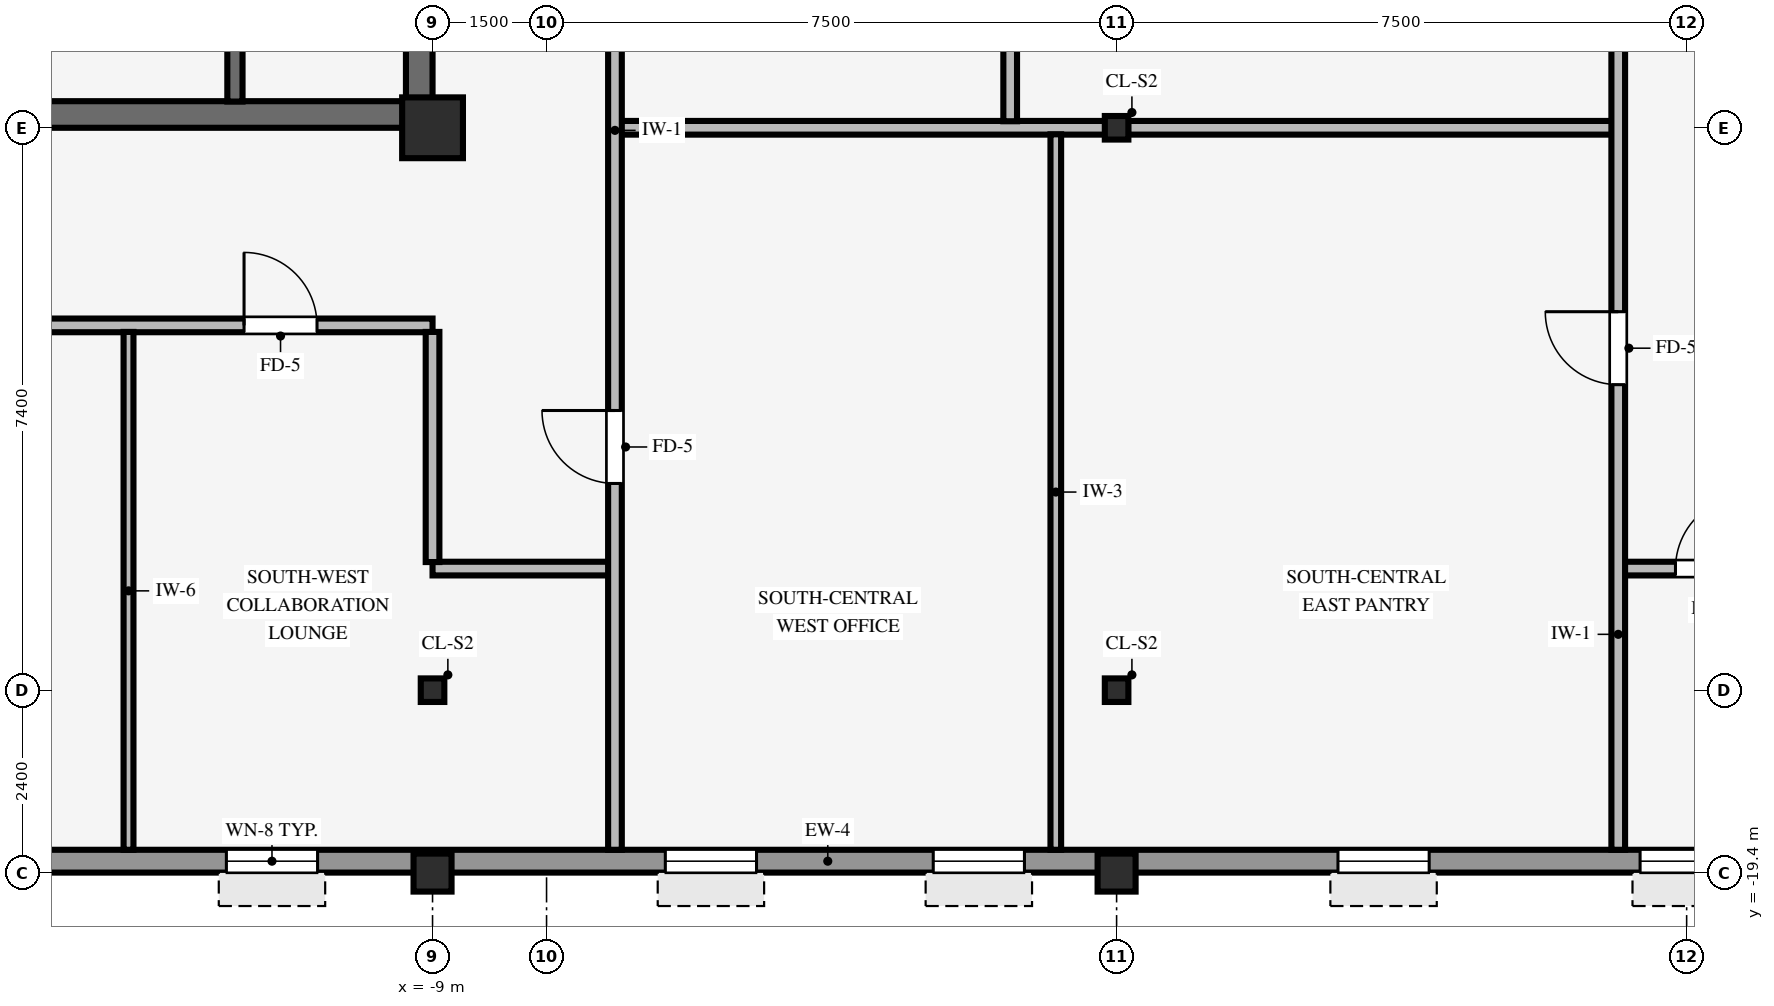
"""IFC4 building model, lengths in metres.
Left out: names, types, materials, properties, quantities, classifications, styles, units other than length and angle.
Written with IfcOpenShell. Run it as: python <this file> out.ifc"""

import sys

from ifc_helpers import new_model, si_unit, direction, frame, frame_2d, origin, origin_2d, place, context, subcontext, project, spatial, rectangle, hollow_rectangle, i_section, extrude, source, transform, mapped, element, fill, save


model = new_model("IFC4")
c1 = context("Model", 3, precision=1e-05, world=origin(), true_north=direction((0.0, 1.0)))
c2 = subcontext(c1, "Body", "Model", "MODEL_VIEW")
j1 = project(units=[si_unit("LENGTHUNIT", "METRE"), si_unit("PLANEANGLEUNIT", "RADIAN")], contexts=[c1])
p1 = place(None, origin())
s1 = spatial("IfcSite", under=j1, at=p1, CompositionType="ELEMENT")
p2 = place(p1, origin())
s2 = spatial("IfcBuilding", under=s1, at=p2, CompositionType="ELEMENT")
p3 = place(p2, frame((0.0, 0.0, 238.35)))
s3 = spatial("IfcBuildingStorey", under=s2, at=p3, CompositionType="ELEMENT", Elevation=238.35)
p4 = place(p3, frame((-17.5, -9.425, 0.0), z_axis=(0.0, 0.0, 1.0), x_axis=(1.0, 0.0, 0.0)))
e1 = element("IfcWall", 1, at=p4, inside=s3, PredefinedType="SHEAR", context=c2, shape_type="SweptSolid", body=[
    extrude(rectangle(XDim=8.5, YDim=0.35, at=frame_2d((4.25, 0.0))), origin(), (0.0, 0.0, 1.0), 3.37),
])
p5 = place(p3, frame((-9.175, -9.255, 0.0), z_axis=(0.0, 0.0, 1.0), x_axis=(0.0, 1.0, 0.0)))
e2 = element("IfcWall", 2, at=p5, inside=s3, PredefinedType="SHEAR", context=c2, shape_type="SweptSolid", body=[
    extrude(rectangle(XDim=18.51, YDim=0.35, at=frame_2d((9.255, 0.0))), origin(), (0.0, 0.0, 1.0), 3.37),
])
p6 = place(p5, frame((8.655, 0.0, 0.0)))
e3 = element("IfcOpeningElement", 3, at=p6, cuts=e2, PredefinedType="OPENING", context=c2, shape_type="SweptSolid", body=[
    extrude(rectangle(XDim=1.2, YDim=2.15, at=frame_2d((0.6, 1.075))), frame((0.0, 0.185, 0.0), z_axis=(0.0, -1.0, 0.0), x_axis=(1.0, 0.0, 0.0)), (0.0, 0.0, 1.0), 0.37),
])
p7 = place(p3, frame((-9.0, -9.6, 0.0), z_axis=(0.0, 0.0, 1.0), x_axis=(1.0, 0.0, 0.0)))
e4 = element("IfcColumn", 4, at=p7, inside=s3, PredefinedType="COLUMN", context=c2, shape_type="SweptSolid", body=[
    extrude(rectangle(XDim=0.8, YDim=0.8, at=origin_2d()), origin(), (0.0, 0.0, 1.0), 3.37),
])
for number, where, z_axis, x_axis in (
    (5, (-9.0, -19.4, 0.0), (0.0, 0.0, 1.0), (1.0, 0.0, 0.0)),
    (6, (0.0, -19.4, 0.0), (0.0, 0.0, 1.0), (1.0, 0.0, 0.0)),
):
    element("IfcColumn", number, at=place(p3, frame(where, z_axis=z_axis, x_axis=x_axis)), inside=s3, PredefinedType="COLUMN", context=c2, shape_type="SweptSolid", body=[
        extrude(hollow_rectangle(XDim=0.5, YDim=0.5, WallThickness=0.032, InnerFilletRadius=0.032, OuterFilletRadius=0.064, at=origin_2d()), origin(), (0.0, 0.0, 1.0), 3.37),
    ])
for number, where, z_axis, x_axis in (
    (7, (0.0, -17.0, 0.0), (0.0, 0.0, 1.0), (1.0, 0.0, 0.0)),
    (8, (0.0, -9.6, 0.0), (0.0, 0.0, 1.0), (1.0, 0.0, 0.0)),
    (9, (-9.0, -17.0, 0.0), (0.0, 0.0, 1.0), (1.0, 0.0, 0.0)),
):
    element("IfcColumn", number, at=place(p3, frame(where, z_axis=z_axis, x_axis=x_axis)), inside=s3, PredefinedType="COLUMN", context=c2, shape_type="SweptSolid", body=[
        extrude(i_section(OverallWidth=0.31, OverallDepth=0.31, WebThickness=0.015, FlangeThickness=0.015, FilletRadius=0.015, at=origin_2d()), origin(), (0.0, 0.0, 1.0), 3.37),
    ])
p8 = place(p3, frame((-24.3, -19.25, 0.0), z_axis=(0.0, 0.0, 1.0), x_axis=(1.0, 0.0, 0.0)))
e10 = element("IfcWall", 10, at=p8, inside=s3, PredefinedType="STANDARD", context=c2, shape_type="SweptSolid", body=[
    extrude(rectangle(XDim=41.0, YDim=0.3, at=frame_2d((20.5, 0.0))), origin(), (0.0, 0.0, 1.0), 2.705),
])
p9 = place(p8, frame((2.837, 0.0, 0.8)))
e11 = element("IfcOpeningElement", 11, at=p9, cuts=e10, PredefinedType="OPENING", context=c2, shape_type="SweptSolid", body=[
    extrude(rectangle(XDim=1.2, YDim=1.48, at=frame_2d((0.6, 0.74))), frame((0.0, 0.16, 0.0), z_axis=(0.0, -1.0, 0.0), x_axis=(1.0, 0.0, 0.0)), (0.0, 0.0, 1.0), 0.32),
])
p10 = place(p8, frame((7.712, 0.0, 0.8)))
e12 = element("IfcOpeningElement", 12, at=p10, cuts=e10, PredefinedType="OPENING", context=c2, shape_type="SweptSolid", body=[
    extrude(rectangle(XDim=1.2, YDim=1.48, at=frame_2d((0.6, 0.74))), frame((0.0, 0.16, 0.0), z_axis=(0.0, -1.0, 0.0), x_axis=(1.0, 0.0, 0.0)), (0.0, 0.0, 1.0), 0.32),
])
p11 = place(p8, frame((12.587, 0.0, 0.8)))
e13 = element("IfcOpeningElement", 13, at=p11, cuts=e10, PredefinedType="OPENING", context=c2, shape_type="SweptSolid", body=[
    extrude(rectangle(XDim=1.2, YDim=1.48, at=frame_2d((0.6, 0.74))), frame((0.0, 0.16, 0.0), z_axis=(0.0, -1.0, 0.0), x_axis=(1.0, 0.0, 0.0)), (0.0, 0.0, 1.0), 0.32),
])
p12 = place(p8, frame((18.363, 0.0, 0.8)))
e14 = element("IfcOpeningElement", 14, at=p12, cuts=e10, PredefinedType="OPENING", context=c2, shape_type="SweptSolid", body=[
    extrude(rectangle(XDim=1.2, YDim=1.48, at=frame_2d((0.6, 0.74))), frame((0.0, 0.16, 0.0), z_axis=(0.0, -1.0, 0.0), x_axis=(1.0, 0.0, 0.0)), (0.0, 0.0, 1.0), 0.32),
])
p13 = place(p8, frame((21.887, 0.0, 0.8)))
e15 = element("IfcOpeningElement", 15, at=p13, cuts=e10, PredefinedType="OPENING", context=c2, shape_type="SweptSolid", body=[
    extrude(rectangle(XDim=1.2, YDim=1.48, at=frame_2d((0.6, 0.74))), frame((0.0, 0.16, 0.0), z_axis=(0.0, -1.0, 0.0), x_axis=(1.0, 0.0, 0.0)), (0.0, 0.0, 1.0), 0.32),
])
p14 = place(p8, frame((27.212, 0.0, 0.8)))
e16 = element("IfcOpeningElement", 16, at=p14, cuts=e10, PredefinedType="OPENING", context=c2, shape_type="SweptSolid", body=[
    extrude(rectangle(XDim=1.2, YDim=1.48, at=frame_2d((0.6, 0.74))), frame((0.0, 0.16, 0.0), z_axis=(0.0, -1.0, 0.0), x_axis=(1.0, 0.0, 0.0)), (0.0, 0.0, 1.0), 0.32),
])
p15 = place(p8, frame((31.188, 0.0, 0.8)))
e17 = element("IfcOpeningElement", 17, at=p15, cuts=e10, PredefinedType="OPENING", context=c2, shape_type="SweptSolid", body=[
    extrude(rectangle(XDim=1.2, YDim=1.48, at=frame_2d((0.6, 0.74))), frame((0.0, 0.16, 0.0), z_axis=(0.0, -1.0, 0.0), x_axis=(1.0, 0.0, 0.0)), (0.0, 0.0, 1.0), 0.32),
])
p16 = place(p8, frame((36.962, 0.0, 0.8)))
e18 = element("IfcOpeningElement", 18, at=p16, cuts=e10, PredefinedType="OPENING", context=c2, shape_type="SweptSolid", body=[
    extrude(rectangle(XDim=1.2, YDim=1.48, at=frame_2d((0.6, 0.74))), frame((0.0, 0.16, 0.0), z_axis=(0.0, -1.0, 0.0), x_axis=(1.0, 0.0, 0.0)), (0.0, 0.0, 1.0), 0.32),
])
p17 = place(p3, frame((-11.6, -9.255, 0.0), z_axis=(0.0, 0.0, 1.0), x_axis=(0.0, 1.0, 0.0)))
e19 = element("IfcWall", 19, at=p17, inside=s3, PredefinedType="SHEAR", context=c2, shape_type="SweptSolid", body=[
    extrude(rectangle(XDim=8.025, YDim=0.2, at=frame_2d((4.012, 0.0))), origin(), (0.0, 0.0, 1.0), 3.37),
])
p18 = place(p17, frame((1.315, 0.0, 0.0)))
e20 = element("IfcOpeningElement", 20, at=p18, cuts=e19, PredefinedType="OPENING", context=c2, shape_type="SweptSolid", body=[
    extrude(rectangle(XDim=0.88, YDim=2.1, at=frame_2d((0.44, 1.05))), frame((0.0, 0.11, 0.0), z_axis=(0.0, -1.0, 0.0), x_axis=(1.0, 0.0, 0.0)), (0.0, 0.0, 1.0), 0.22),
])
p19 = place(p17, frame((5.615, 0.0, 0.0)))
e21 = element("IfcOpeningElement", 21, at=p19, cuts=e19, PredefinedType="OPENING", context=c2, shape_type="SweptSolid", body=[
    extrude(rectangle(XDim=0.88, YDim=2.1, at=frame_2d((0.44, 1.05))), frame((0.0, 0.11, 0.0), z_axis=(0.0, -1.0, 0.0), x_axis=(1.0, 0.0, 0.0)), (0.0, 0.0, 1.0), 0.22),
])
p20 = place(p3, frame((-9.0, -15.4, 0.0), z_axis=(0.0, 0.0, 1.0), x_axis=(1.0, 0.0, 0.0)))
e22 = element("IfcWall", 22, at=p20, inside=s3, PredefinedType="PARTITIONING", context=c2, shape_type="SweptSolid", body=[
    extrude(rectangle(XDim=2.339, YDim=0.18, at=frame_2d((1.169, 0.0))), origin(), (0.0, 0.0, 1.0), 3.36),
])
p21 = place(p3, frame((6.666, -15.4, 0.0), z_axis=(0.0, 0.0, 1.0), x_axis=(1.0, 0.0, 0.0)))
e23 = element("IfcWall", 23, at=p21, inside=s3, PredefinedType="PARTITIONING", context=c2, shape_type="SweptSolid", body=[
    extrude(rectangle(XDim=11.834, YDim=0.18, at=frame_2d((5.917, 0.0))), origin(), (0.0, 0.0, 1.0), 3.36),
])
p22 = place(p21, frame((0.687, 0.0, 0.0)))
e24 = element("IfcOpeningElement", 24, at=p22, cuts=e23, PredefinedType="OPENING", context=c2, shape_type="SweptSolid", body=[
    extrude(rectangle(XDim=0.96, YDim=2.1, at=frame_2d((0.48, 1.05))), frame((0.0, 0.1, 0.0), z_axis=(0.0, -1.0, 0.0), x_axis=(1.0, 0.0, 0.0)), (0.0, 0.0, 1.0), 0.2),
])
p23 = place(p3, frame((-15.0, -12.2, 0.0), z_axis=(0.0, 0.0, 1.0), x_axis=(1.0, 0.0, 0.0)))
e25 = element("IfcWall", 25, at=p23, inside=s3, PredefinedType="PARTITIONING", context=c2, shape_type="SweptSolid", body=[
    extrude(rectangle(XDim=6.0, YDim=0.18, at=frame_2d((3.0, 0.0))), origin(), (0.0, 0.0, 1.0), 3.36),
])
p24 = place(p23, frame((3.52, 0.0, 0.0)))
e26 = element("IfcOpeningElement", 26, at=p24, cuts=e25, PredefinedType="OPENING", context=c2, shape_type="SweptSolid", body=[
    extrude(rectangle(XDim=0.96, YDim=2.1, at=frame_2d((0.48, 1.05))), frame((0.0, 0.1, 0.0), z_axis=(0.0, -1.0, 0.0), x_axis=(1.0, 0.0, 0.0)), (0.0, 0.0, 1.0), 0.2),
])
p25 = place(p3, frame((-6.539, -9.6, 0.0), z_axis=(0.0, 0.0, 1.0), x_axis=(1.0, 0.0, 0.0)))
e27 = element("IfcWall", 27, at=p25, inside=s3, PredefinedType="PARTITIONING", context=c2, shape_type="SweptSolid", body=[
    extrude(rectangle(XDim=6.388, YDim=0.18, at=frame_2d((3.194, 0.0))), origin(), (0.0, 0.0, 1.0), 2.405),
])
p26 = place(p3, frame((0.151, -9.6, 0.0), z_axis=(0.0, 0.0, 1.0), x_axis=(1.0, 0.0, 0.0)))
e28 = element("IfcWall", 28, at=p26, inside=s3, PredefinedType="PARTITIONING", context=c2, shape_type="SweptSolid", body=[
    extrude(rectangle(XDim=6.383, YDim=0.18, at=frame_2d((3.191, 0.0))), origin(), (0.0, 0.0, 1.0), 2.405),
])
p27 = place(p3, frame((-13.0, -19.1, 0.0), z_axis=(0.0, 0.0, 1.0), x_axis=(0.0, 1.0, 0.0)))
e29 = element("IfcWall", 29, at=p27, inside=s3, PredefinedType="PARTITIONING", context=c2, shape_type="SweptSolid", body=[
    extrude(rectangle(XDim=6.814, YDim=0.13, at=frame_2d((3.407, 0.0))), origin(), (0.0, 0.0, 1.0), 3.36),
])
p28 = place(p3, frame((-9.0, -15.314, 0.0), z_axis=(0.0, 0.0, 1.0), x_axis=(0.0, 1.0, 0.0)))
e30 = element("IfcWall", 30, at=p28, inside=s3, PredefinedType="PARTITIONING", context=c2, shape_type="SweptSolid", body=[
    extrude(rectangle(XDim=3.028, YDim=0.18, at=frame_2d((1.514, 0.0))), origin(), (0.0, 0.0, 1.0), 2.892),
])
p29 = place(p3, frame((-6.6, -19.1, 0.0), z_axis=(0.0, 0.0, 1.0), x_axis=(0.0, 1.0, 0.0)))
e31 = element("IfcWall", 31, at=p29, inside=s3, PredefinedType="PARTITIONING", context=c2, shape_type="SweptSolid", body=[
    extrude(rectangle(XDim=17.764, YDim=0.18, at=frame_2d((8.882, 0.0))), origin(), (0.0, 0.0, 1.0), 3.36),
])
p30 = place(p29, frame((13.152, 0.0, 0.0)))
e32 = element("IfcOpeningElement", 32, at=p30, cuts=e31, PredefinedType="OPENING", context=c2, shape_type="SweptSolid", body=[
    extrude(rectangle(XDim=0.96, YDim=2.1, at=frame_2d((0.48, 1.05))), frame((0.0, 0.1, 0.0), z_axis=(0.0, -1.0, 0.0), x_axis=(1.0, 0.0, 0.0)), (0.0, 0.0, 1.0), 0.2),
])
p31 = place(p29, frame((4.82, 0.0, 0.0)))
e33 = element("IfcOpeningElement", 33, at=p31, cuts=e31, PredefinedType="OPENING", context=c2, shape_type="SweptSolid", body=[
    extrude(rectangle(XDim=0.96, YDim=2.1, at=frame_2d((0.48, 1.05))), frame((0.0, 0.1, 0.0), z_axis=(0.0, -1.0, 0.0), x_axis=(1.0, 0.0, 0.0)), (0.0, 0.0, 1.0), 0.2),
])
p32 = place(p3, frame((-1.4, -9.514, 0.0), z_axis=(0.0, 0.0, 1.0), x_axis=(0.0, 1.0, 0.0)))
e34 = element("IfcWall", 34, at=p32, inside=s3, PredefinedType="PARTITIONING", context=c2, shape_type="SweptSolid", body=[
    extrude(rectangle(XDim=8.178, YDim=0.18, at=frame_2d((4.089, 0.0))), origin(), (0.0, 0.0, 1.0), 3.36),
])
p33 = place(p3, frame((-0.8, -19.1, 0.0), z_axis=(0.0, 0.0, 1.0), x_axis=(0.0, 1.0, 0.0)))
e35 = element("IfcWall", 35, at=p33, inside=s3, PredefinedType="PARTITIONING", context=c2, shape_type="SweptSolid", body=[
    extrude(rectangle(XDim=9.414, YDim=0.14, at=frame_2d((4.707, 0.0))), origin(), (0.0, 0.0, 1.0), 3.36),
])
p34 = place(p3, frame((6.6, -19.1, 0.0), z_axis=(0.0, 0.0, 1.0), x_axis=(0.0, 1.0, 0.0)))
e36 = element("IfcWall", 36, at=p34, inside=s3, PredefinedType="PARTITIONING", context=c2, shape_type="SweptSolid", body=[
    extrude(rectangle(XDim=17.764, YDim=0.18, at=frame_2d((8.882, 0.0))), origin(), (0.0, 0.0, 1.0), 3.36),
])
p35 = place(p34, frame((13.152, 0.0, 0.0)))
e37 = element("IfcOpeningElement", 37, at=p35, cuts=e36, PredefinedType="OPENING", context=c2, shape_type="SweptSolid", body=[
    extrude(rectangle(XDim=0.96, YDim=2.1, at=frame_2d((0.48, 1.05))), frame((0.0, 0.1, 0.0), z_axis=(0.0, -1.0, 0.0), x_axis=(1.0, 0.0, 0.0)), (0.0, 0.0, 1.0), 0.2),
])
p36 = place(p34, frame((6.12, 0.0, 0.0)))
e38 = element("IfcOpeningElement", 38, at=p36, cuts=e36, PredefinedType="OPENING", context=c2, shape_type="SweptSolid", body=[
    extrude(rectangle(XDim=0.96, YDim=2.1, at=frame_2d((0.48, 1.05))), frame((0.0, 0.1, 0.0), z_axis=(0.0, -1.0, 0.0), x_axis=(1.0, 0.0, 0.0)), (0.0, 0.0, 1.0), 0.2),
])
m1 = source(origin(), c2, "Body", "SweptSolid", [
    extrude(rectangle(XDim=1.2, YDim=1.48, at=frame_2d((0.6, 0.74))), frame((0.0, 0.03, 0.0), z_axis=(0.0, -1.0, 0.0), x_axis=(1.0, 0.0, 0.0)), (0.0, 0.0, 1.0), 0.06),
])
p37 = place(p11, origin())
e39 = element("IfcWindow", 39, at=p37, inside=s3, PartitioningType="SINGLE_PANEL", PredefinedType="WINDOW", context=c2, shape_type="MappedRepresentation", body=[
    mapped(m1, transform((0.0, 0.0, 0.0), scale=1.0)),
])
fill(e13, e39)
p38 = place(p12, origin())
e40 = element("IfcWindow", 40, at=p38, inside=s3, PartitioningType="SINGLE_PANEL", PredefinedType="WINDOW", context=c2, shape_type="MappedRepresentation", body=[
    mapped(m1, transform((0.0, 0.0, 0.0), scale=1.0)),
])
fill(e14, e40)
p39 = place(p13, origin())
e41 = element("IfcWindow", 41, at=p39, inside=s3, PartitioningType="SINGLE_PANEL", PredefinedType="WINDOW", context=c2, shape_type="MappedRepresentation", body=[
    mapped(m1, transform((0.0, 0.0, 0.0), scale=1.0)),
])
fill(e15, e41)
p40 = place(p14, origin())
e42 = element("IfcWindow", 42, at=p40, inside=s3, PartitioningType="SINGLE_PANEL", PredefinedType="WINDOW", context=c2, shape_type="MappedRepresentation", body=[
    mapped(m1, transform((0.0, 0.0, 0.0), scale=1.0)),
])
fill(e16, e42)
p41 = place(p15, origin())
e43 = element("IfcWindow", 43, at=p41, inside=s3, PartitioningType="SINGLE_PANEL", PredefinedType="WINDOW", context=c2, shape_type="MappedRepresentation", body=[
    mapped(m1, transform((0.0, 0.0, 0.0), scale=1.0)),
])
fill(e17, e43)
m2 = source(origin(), c2, "Body", "SweptSolid", [
    extrude(rectangle(XDim=0.96, YDim=2.1, at=frame_2d((0.48, 1.05))), frame((0.0, 0.025, 0.0), z_axis=(0.0, -1.0, 0.0), x_axis=(1.0, 0.0, 0.0)), (0.0, 0.0, 1.0), 0.05),
])
p42 = place(p36, origin())
e44 = element("IfcDoor", 44, at=p42, inside=s3, OperationType="SINGLE_SWING_RIGHT", PredefinedType="DOOR", context=c2, shape_type="MappedRepresentation", body=[
    mapped(m2, transform((0.0, 0.0, 0.0), scale=1.0)),
])
fill(e38, e44)
p43 = place(p24, origin())
e45 = element("IfcDoor", 45, at=p43, inside=s3, OperationType="SINGLE_SWING_LEFT", PredefinedType="DOOR", context=c2, shape_type="MappedRepresentation", body=[
    mapped(m2, transform((0.0, 0.0, 0.0), scale=1.0)),
])
fill(e26, e45)
p44 = place(p31, origin())
e46 = element("IfcDoor", 46, at=p44, inside=s3, OperationType="SINGLE_SWING_RIGHT", PredefinedType="DOOR", context=c2, shape_type="MappedRepresentation", body=[
    mapped(m2, transform((0.0, 0.0, 0.0), scale=1.0)),
])
fill(e33, e46)
p45 = place(p22, origin())
e47 = element("IfcDoor", 47, at=p45, inside=s3, OperationType="SINGLE_SWING_RIGHT", PredefinedType="DOOR", context=c2, shape_type="MappedRepresentation", body=[
    mapped(m2, transform((0.0, 0.0, 0.0), scale=1.0)),
])
fill(e24, e47)
save(model, sys.argv[1])
